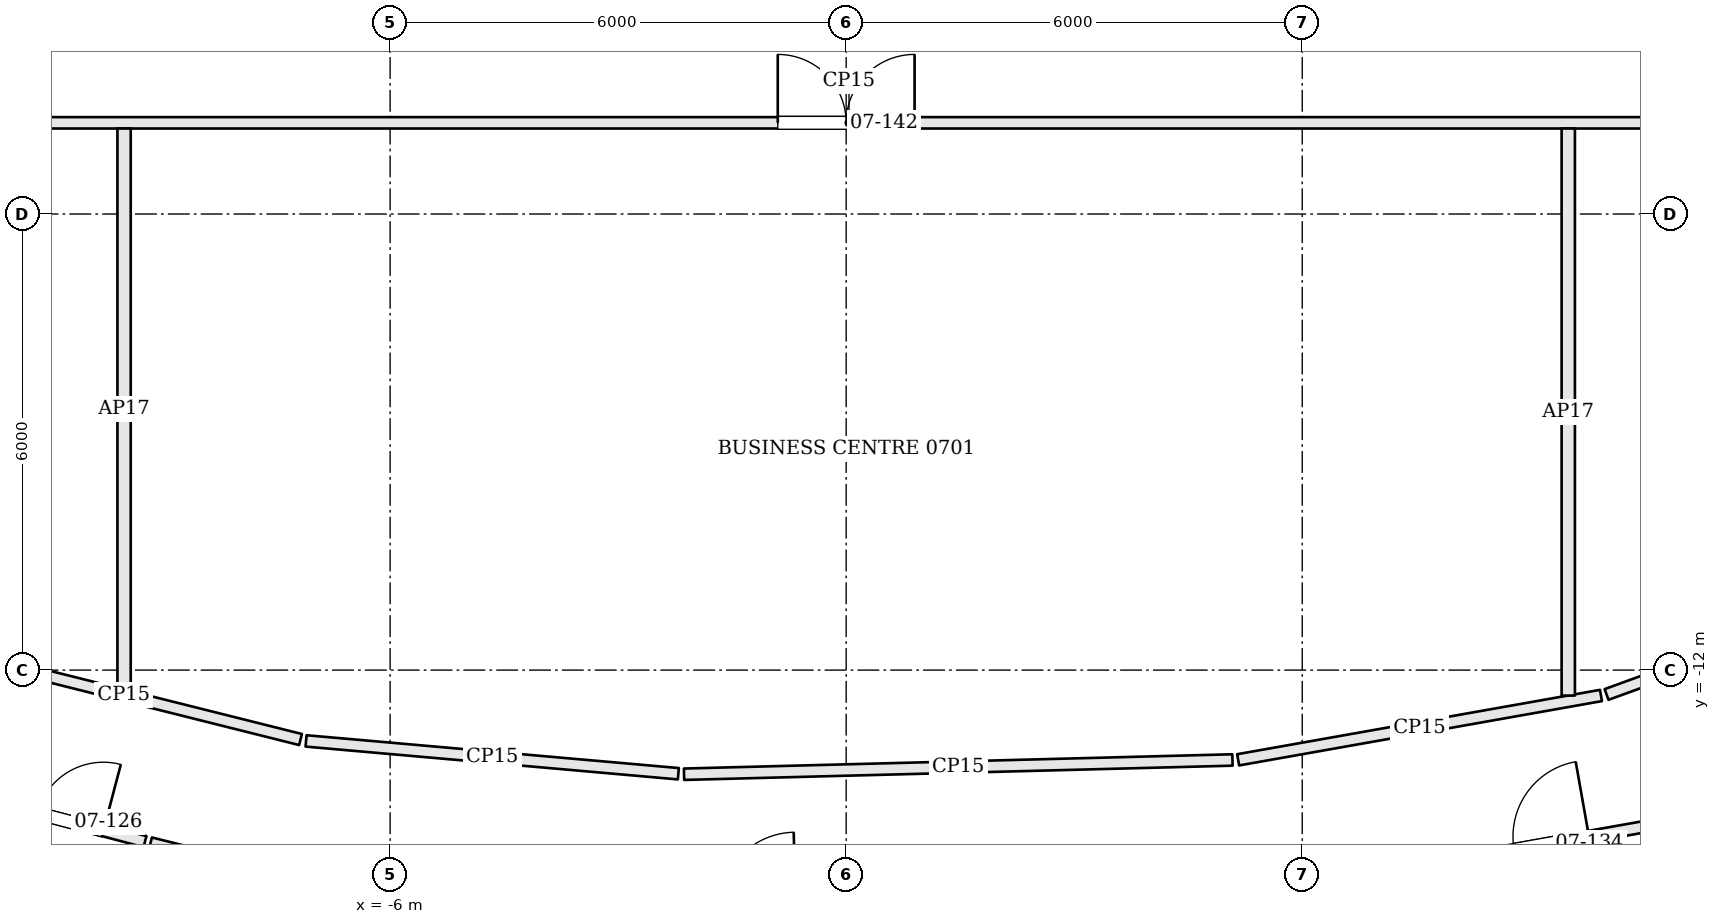
"""IFC4 building model, lengths in metres.
Left out: names, types, materials, properties, quantities, classifications, styles, units other than length and angle.
Written with IfcOpenShell. Run it as: python <this file> out.ifc"""

import sys

from ifc_helpers import new_model, si_unit, direction, frame, frame_2d, origin, place, context, subcontext, project, spatial, rectangle, extrude, element, fill, save


model = new_model("IFC4")
c1 = context("Model", 3, precision=1e-05, world=origin(), true_north=direction((0.0, 1.0)))
c2 = subcontext(c1, "Body", "Model", "MODEL_VIEW")
j1 = project(units=[si_unit("LENGTHUNIT", "METRE"), si_unit("PLANEANGLEUNIT", "RADIAN")], contexts=[c1])
p1 = place(None, origin())
s1 = spatial("IfcSite", under=j1, at=p1, CompositionType="ELEMENT")
p2 = place(p1, origin())
s2 = spatial("IfcBuilding", under=s1, at=p2, CompositionType="ELEMENT")
p3 = place(p2, frame((0.0, 0.0, 41.1)))
s3 = spatial("IfcBuildingStorey", under=s2, at=p3, CompositionType="ELEMENT", Elevation=41.1)
p4 = place(p3, frame((-12.568, -13.374, 0.0), z_axis=(0.0, 0.0, 1.0), x_axis=(0.966885838623, -0.255209277007, 0.0)))
e1 = element("IfcWall", 1, at=p4, inside=s3, PredefinedType="PARTITIONING", context=c2, shape_type="SweptSolid", body=[
    extrude(rectangle(XDim=3.457, YDim=0.15, at=frame_2d((1.729, 0.0))), origin(), (0.0, 0.0, 1.0), 2.68),
])
p5 = place(p4, frame((1.991, 0.0, 0.0)))
e2 = element("IfcOpeningElement", 2, at=p5, cuts=e1, PredefinedType="OPENING", context=c2, shape_type="SweptSolid", body=[
    extrude(rectangle(XDim=0.9, YDim=2.4, at=frame_2d((0.45, 1.2))), frame((0.0, 0.085, 0.0), z_axis=(0.0, -1.0, 0.0), x_axis=(1.0, 0.0, 0.0)), (0.0, 0.0, 1.0), 0.17),
])
p6 = place(p3, frame((-9.152, -14.274, 0.0), z_axis=(0.0, 0.0, 1.0), x_axis=(0.969966784833, -0.243237407323, 0.0)))
e3 = element("IfcWall", 3, at=p6, inside=s3, PredefinedType="PARTITIONING", context=c2, shape_type="SweptSolid", body=[
    extrude(rectangle(XDim=1.801, YDim=0.15, at=frame_2d((0.9, 0.0))), origin(), (0.0, 0.0, 1.0), 2.68),
])
p7 = place(p3, frame((5.413, -14.963, 0.0), z_axis=(0.0, 0.0, 1.0), x_axis=(0.984633017555, 0.174636252655, 0.0)))
e4 = element("IfcWall", 4, at=p7, inside=s3, PredefinedType="PARTITIONING", context=c2, shape_type="SweptSolid", body=[
    extrude(rectangle(XDim=5.139, YDim=0.15, at=frame_2d((2.569, 0.0))), origin(), (0.0, 0.0, 1.0), 2.68),
])
p8 = place(p7, frame((3.428, 0.0, 0.0)))
e5 = element("IfcOpeningElement", 5, at=p8, cuts=e4, PredefinedType="OPENING", context=c2, shape_type="SweptSolid", body=[
    extrude(rectangle(XDim=1.0, YDim=2.1, at=frame_2d((0.5, 1.05))), frame((0.0, 0.085, 0.0), z_axis=(0.0, -1.0, 0.0), x_axis=(1.0, 0.0, 0.0)), (0.0, 0.0, 1.0), 0.17),
])
p9 = place(p3, frame((13.511, -11.043, 0.0), z_axis=(0.0, 0.0, 1.0), x_axis=(-0.939583191704, -0.342320647736, 0.0)))
e6 = element("IfcWall", 6, at=p9, inside=s3, PredefinedType="PARTITIONING", context=c2, shape_type="SweptSolid", body=[
    extrude(rectangle(XDim=3.733, YDim=0.15, at=frame_2d((1.866, 0.0))), origin(), (0.0, 0.0, 1.0), 2.68),
])
p10 = place(p3, frame((9.93, -12.334, 0.0), z_axis=(0.0, 0.0, 1.0), x_axis=(-0.984638212434, -0.174606960386, 0.0)))
e7 = element("IfcWall", 7, at=p10, inside=s3, PredefinedType="PARTITIONING", context=c2, shape_type="SweptSolid", body=[
    extrude(rectangle(XDim=4.848, YDim=0.15, at=frame_2d((2.424, 0.0))), origin(), (0.0, 0.0, 1.0), 2.68),
])
p11 = place(p3, frame((5.082, -13.182, 0.0), z_axis=(0.0, 0.0, 1.0), x_axis=(-0.999661624383, -0.026012242045, 0.0)))
e8 = element("IfcWall", 8, at=p11, inside=s3, PredefinedType="PARTITIONING", context=c2, shape_type="SweptSolid", body=[
    extrude(rectangle(XDim=7.218, YDim=0.15, at=frame_2d((3.609, 0.0))), origin(), (0.0, 0.0, 1.0), 2.68),
])
p12 = place(p3, frame((-2.208, -13.364, 0.0), z_axis=(0.0, 0.0, 1.0), x_axis=(-0.996134962793, 0.087835846335, 0.0)))
e9 = element("IfcWall", 9, at=p12, inside=s3, PredefinedType="PARTITIONING", context=c2, shape_type="SweptSolid", body=[
    extrude(rectangle(XDim=4.917, YDim=0.15, at=frame_2d((2.458, 0.0))), origin(), (0.0, 0.0, 1.0), 2.68),
])
p13 = place(p3, frame((-7.178, -12.914, 0.0), z_axis=(0.0, 0.0, 1.0), x_axis=(-0.969983523639, 0.243170647628, 0.0)))
e10 = element("IfcWall", 10, at=p13, inside=s3, PredefinedType="PARTITIONING", context=c2, shape_type="SweptSolid", body=[
    extrude(rectangle(XDim=4.794, YDim=0.15, at=frame_2d((2.397, 0.0))), origin(), (0.0, 0.0, 1.0), 2.68),
])
p14 = place(p3, frame((-14.725, -4.8, 0.0), z_axis=(0.0, 0.0, 1.0), x_axis=(1.0, 0.0, 0.0)))
e11 = element("IfcWall", 11, at=p14, inside=s3, PredefinedType="PARTITIONING", context=c2, shape_type="SweptSolid", body=[
    extrude(rectangle(XDim=29.525, YDim=0.15, at=frame_2d((14.763, 0.0))), origin(), (0.0, 0.0, 1.0), 2.68),
])
p15 = place(p14, frame((13.825, 0.0, 0.0)))
e12 = element("IfcOpeningElement", 12, at=p15, cuts=e11, PredefinedType="OPENING", context=c2, shape_type="SweptSolid", body=[
    extrude(rectangle(XDim=1.8, YDim=2.1, at=frame_2d((0.9, 1.05))), frame((0.0, 0.085, 0.0), z_axis=(0.0, -1.0, 0.0), x_axis=(1.0, 0.0, 0.0)), (0.0, 0.0, 1.0), 0.17),
])
p16 = place(p3, frame((-9.5, -12.257, 0.0), z_axis=(0.0, 0.0, 1.0), x_axis=(0.0, 1.0, 0.0)))
e13 = element("IfcWall", 13, at=p16, inside=s3, PredefinedType="PARTITIONING", context=c2, shape_type="SweptSolid", body=[
    extrude(rectangle(XDim=7.382, YDim=0.175, at=frame_2d((3.691, 0.0))), origin(), (0.0, 0.0, 1.0), 2.68),
])
p17 = place(p3, frame((9.5, -12.335, 0.0), z_axis=(0.0, 0.0, 1.0), x_axis=(0.0, 1.0, 0.0)))
e14 = element("IfcWall", 14, at=p17, inside=s3, PredefinedType="PARTITIONING", context=c2, shape_type="SweptSolid", body=[
    extrude(rectangle(XDim=7.46, YDim=0.175, at=frame_2d((3.73, 0.0))), origin(), (0.0, 0.0, 1.0), 2.68),
])
p18 = place(p5, origin())
e15 = element("IfcDoor", 15, at=p18, inside=s3, OperationType="SINGLE_SWING_RIGHT", PredefinedType="DOOR", context=c2, shape_type="SweptSolid", body=[
    extrude(rectangle(XDim=0.9, YDim=2.4, at=frame_2d((0.45, 1.2))), frame((0.0, 0.025, 0.0), z_axis=(0.0, -1.0, 0.0), x_axis=(1.0, 0.0, 0.0)), (0.0, 0.0, 1.0), 0.05),
])
fill(e2, e15)
p19 = place(p8, origin())
e16 = element("IfcDoor", 16, at=p19, inside=s3, OperationType="SINGLE_SWING_RIGHT", PredefinedType="DOOR", context=c2, shape_type="SweptSolid", body=[
    extrude(rectangle(XDim=1.0, YDim=2.1, at=frame_2d((0.5, 1.05))), frame((0.0, 0.025, 0.0), z_axis=(0.0, -1.0, 0.0), x_axis=(1.0, 0.0, 0.0)), (0.0, 0.0, 1.0), 0.05),
])
fill(e5, e16)
p20 = place(p15, origin())
e17 = element("IfcDoor", 17, at=p20, inside=s3, OperationType="DOUBLE_DOOR_SINGLE_SWING", PredefinedType="DOOR", context=c2, shape_type="SweptSolid", body=[
    extrude(rectangle(XDim=1.8, YDim=2.1, at=frame_2d((0.9, 1.05))), frame((0.0, 0.025, 0.0), z_axis=(0.0, -1.0, 0.0), x_axis=(1.0, 0.0, 0.0)), (0.0, 0.0, 1.0), 0.05),
])
fill(e12, e17)
save(model, sys.argv[1])
